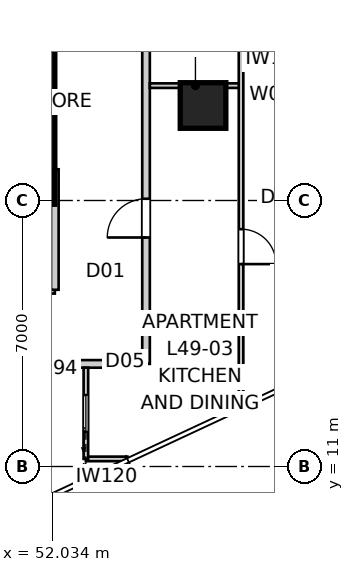
"""IFC4 building model, lengths in metres.
Left out: names, types, materials, properties, quantities, classifications, styles, units other than length and angle.
Written with IfcOpenShell. Run it as: python <this file> out.ifc"""

import sys

from ifc_helpers import new_model, si_unit, direction, frame, frame_2d, origin, origin_2d, place, context, subcontext, project, spatial, polyline, rectangle, outline, extrude, element, fill, save


model = new_model("IFC4")
c1 = context("Model", 3, precision=1e-05, world=origin(), true_north=direction((0.0, 1.0)))
c2 = subcontext(c1, "Body", "Model", "MODEL_VIEW")
j1 = project(units=[si_unit("LENGTHUNIT", "METRE"), si_unit("PLANEANGLEUNIT", "RADIAN")], contexts=[c1])
p1 = place(None, origin())
s1 = spatial("IfcSite", under=j1, at=p1, CompositionType="ELEMENT")
p2 = place(p1, origin())
s2 = spatial("IfcBuilding", under=s1, at=p2, CompositionType="ELEMENT")
p3 = place(p2, frame((0.0, 0.0, 179.4)))
s3 = spatial("IfcBuildingStorey", under=s2, at=p3, CompositionType="ELEMENT", Elevation=179.4)
p4 = place(p3, frame((51.65, 18.8, 0.0), z_axis=(0.0, 0.0, 1.0), x_axis=(0.0, 1.0, 0.0)))
e1 = element("IfcWall", 1, at=p4, inside=s3, PredefinedType="SHEAR", context=c2, shape_type="SweptSolid", body=[
    extrude(outline(polyline([(0.0, -0.45), (22.4, -0.45), (22.4, -0.025), (22.85, -0.025), (22.85, 0.025), (22.4, 0.025), (22.4, 0.45), (0.0, 0.45), (0.0, 0.025), (-0.45, 0.025), (-0.45, -0.025), (0.0, -0.025), (0.0, -0.45)])), origin(), (0.0, 0.0, 1.0), 3.4),
])
p5 = place(p4, frame((11.14, 0.0, 0.0)))
e2 = element("IfcOpeningElement", 2, at=p5, cuts=e1, PredefinedType="OPENING", context=c2, shape_type="SweptSolid", body=[
    extrude(rectangle(XDim=1.02, YDim=2.4, at=frame_2d((0.51, 1.2))), frame((0.0, 0.46, 0.0), z_axis=(0.0, -1.0, 0.0), x_axis=(1.0, 0.0, 0.0)), (0.0, 0.0, 1.0), 0.92),
])
p6 = place(p3, frame((51.65, 18.35, 0.0), z_axis=(0.0, 0.0, 1.0), x_axis=(1.0, 0.0, 0.0)))
e3 = element("IfcColumn", 3, at=p6, inside=s3, PredefinedType="COLUMN", context=c2, shape_type="SweptSolid", body=[
    extrude(rectangle(XDim=0.9, YDim=0.9, at=origin_2d()), origin(), (0.0, 0.0, 1.0), 3.4),
])
p7 = place(p3, frame((56.0, 20.5, 0.0), z_axis=(0.0, 0.0, 1.0), x_axis=(1.0, 0.0, 0.0)))
e4 = element("IfcColumn", 4, at=p7, inside=s3, PredefinedType="COLUMN", context=c2, shape_type="SweptSolid", body=[
    extrude(rectangle(XDim=1.2, YDim=1.2, at=origin_2d()), origin(), (0.0, 0.0, 1.0), 3.4),
])
p8 = place(p3, frame((49.242, 13.7, 0.0), z_axis=(0.0, 0.0, 1.0), x_axis=(1.0, 0.0, 0.0)))
e5 = element("IfcWall", 5, at=p8, inside=s3, PredefinedType="PARTITIONING", context=c2, shape_type="SweptSolid", body=[
    extrude(rectangle(XDim=5.258, YDim=0.2, at=frame_2d((2.629, 0.0))), origin(), (0.0, 0.0, 1.0), 3.25),
])
p9 = place(p3, frame((54.5, 13.7, 0.0), z_axis=(0.0, 0.0, 1.0), x_axis=(0.0, 1.0, 0.0)))
e6 = element("IfcWall", 6, at=p9, inside=s3, PredefinedType="PARTITIONING", context=c2, shape_type="SweptSolid", body=[
    extrude(rectangle(XDim=32.6, YDim=0.2, at=frame_2d((16.3, 0.0))), origin(), (0.0, 0.0, 1.0), 3.25),
])
p10 = place(p9, frame((3.326, 0.0, 0.0)))
e7 = element("IfcOpeningElement", 7, at=p10, cuts=e6, PredefinedType="OPENING", context=c2, shape_type="SweptSolid", body=[
    extrude(rectangle(XDim=1.02, YDim=2.34, at=frame_2d((0.51, 1.17))), frame((0.0, 0.11, 0.0), z_axis=(0.0, -1.0, 0.0), x_axis=(1.0, 0.0, 0.0)), (0.0, 0.0, 1.0), 0.22),
])
p11 = place(p9, frame((19.161, 0.0, 0.0)))
e8 = element("IfcOpeningElement", 8, at=p11, cuts=e6, PredefinedType="OPENING", context=c2, shape_type="SweptSolid", body=[
    extrude(rectangle(XDim=1.02, YDim=2.34, at=frame_2d((0.51, 1.17))), frame((0.0, 0.11, 0.0), z_axis=(0.0, -1.0, 0.0), x_axis=(1.0, 0.0, 0.0)), (0.0, 0.0, 1.0), 0.22),
])
p12 = place(p9, frame((29.73, 0.0, 0.0)))
e9 = element("IfcOpeningElement", 9, at=p12, cuts=e6, PredefinedType="OPENING", context=c2, shape_type="SweptSolid", body=[
    extrude(rectangle(XDim=1.02, YDim=2.34, at=frame_2d((0.51, 1.17))), frame((0.0, 0.11, 0.0), z_axis=(0.0, -1.0, 0.0), x_axis=(1.0, 0.0, 0.0)), (0.0, 0.0, 1.0), 0.22),
])
p13 = place(p9, frame((23.904, 0.0, 0.0)))
e10 = element("IfcOpeningElement", 10, at=p13, cuts=e6, PredefinedType="OPENING", context=c2, shape_type="SweptSolid", body=[
    extrude(rectangle(XDim=1.02, YDim=2.34, at=frame_2d((0.51, 1.17))), frame((0.0, 0.11, 0.0), z_axis=(0.0, -1.0, 0.0), x_axis=(1.0, 0.0, 0.0)), (0.0, 0.0, 1.0), 0.22),
])
p14 = place(p3, frame((27.9, 15.65, 0.0), z_axis=(0.0, 0.0, 1.0), x_axis=(1.0, 0.0, 0.0)))
e11 = element("IfcWall", 11, at=p14, inside=s3, PredefinedType="PARTITIONING", context=c2, shape_type="SweptSolid", body=[
    extrude(rectangle(XDim=24.2, YDim=0.2, at=frame_2d((12.1, 0.0))), origin(), (0.0, 0.0, 1.0), 3.25),
])
p15 = place(p14, frame((4.391, 0.0, 0.0)))
e12 = element("IfcOpeningElement", 12, at=p15, cuts=e11, PredefinedType="OPENING", context=c2, shape_type="SweptSolid", body=[
    extrude(rectangle(XDim=1.02, YDim=2.1, at=frame_2d((0.51, 1.05))), frame((0.0, 0.11, 0.0), z_axis=(0.0, -1.0, 0.0), x_axis=(1.0, 0.0, 0.0)), (0.0, 0.0, 1.0), 0.22),
])
p16 = place(p14, frame((18.789, 0.0, 0.0)))
e13 = element("IfcOpeningElement", 13, at=p16, cuts=e11, PredefinedType="OPENING", context=c2, shape_type="SweptSolid", body=[
    extrude(rectangle(XDim=1.02, YDim=2.1, at=frame_2d((0.51, 1.05))), frame((0.0, 0.11, 0.0), z_axis=(0.0, -1.0, 0.0), x_axis=(1.0, 0.0, 0.0)), (0.0, 0.0, 1.0), 0.22),
])
p17 = place(p14, frame((11.59, 0.0, 0.0)))
e14 = element("IfcOpeningElement", 14, at=p17, cuts=e11, PredefinedType="OPENING", context=c2, shape_type="SweptSolid", body=[
    extrude(rectangle(XDim=1.02, YDim=2.1, at=frame_2d((0.51, 1.05))), frame((0.0, 0.11, 0.0), z_axis=(0.0, -1.0, 0.0), x_axis=(1.0, 0.0, 0.0)), (0.0, 0.0, 1.0), 0.22),
])
p18 = place(p3, frame((52.1, 15.65, 0.0), z_axis=(0.0, 0.0, 1.0), x_axis=(0.0, 1.0, 0.0)))
e15 = element("IfcWall", 15, at=p18, inside=s3, PredefinedType="PARTITIONING", context=c2, shape_type="SweptSolid", body=[
    extrude(rectangle(XDim=3.17, YDim=0.2, at=frame_2d((1.585, 0.0))), origin(), (0.0, 0.0, 1.0), 3.25),
])
p19 = place(p3, frame((54.6, 21.023, 0.0), z_axis=(0.0, 0.0, 1.0), x_axis=(1.0, 0.0, 0.0)))
e16 = element("IfcWall", 16, at=p19, inside=s3, PredefinedType="PARTITIONING", context=c2, shape_type="SweptSolid", body=[
    extrude(rectangle(XDim=2.4, YDim=0.12, at=frame_2d((1.2, 0.0))), origin(), (0.0, 0.0, 1.0), 3.25),
])
p20 = place(p3, frame((54.011, 11.2, 0.0), z_axis=(0.0, 0.0, 1.0), x_axis=(-1.0, 0.0, 0.0)))
e17 = element("IfcWall", 17, at=p20, inside=s3, PredefinedType="PARTITIONING", context=c2, shape_type="SweptSolid", body=[
    extrude(rectangle(XDim=1.094, YDim=0.12, at=frame_2d((0.547, 0.0))), origin(), (0.0, 0.0, 1.0), 3.25),
])
p21 = place(p3, frame((52.917, 11.2, 0.0), z_axis=(0.0, 0.0, 1.0), x_axis=(0.0, 1.0, 0.0)))
e18 = element("IfcWall", 18, at=p21, inside=s3, PredefinedType="PARTITIONING", context=c2, shape_type="SweptSolid", body=[
    extrude(rectangle(XDim=2.4, YDim=0.12, at=frame_2d((1.2, 0.0))), origin(), (0.0, 0.0, 1.0), 3.25),
])
p22 = place(p21, frame((0.72, 0.0, 0.0)))
e19 = element("IfcOpeningElement", 19, at=p22, cuts=e18, PredefinedType="OPENING", context=c2, shape_type="SweptSolid", body=[
    extrude(rectangle(XDim=0.96, YDim=2.1, at=frame_2d((0.48, 1.05))), frame((0.0, 0.07, 0.0), z_axis=(0.0, -1.0, 0.0), x_axis=(1.0, 0.0, 0.0)), (0.0, 0.0, 1.0), 0.14),
])
p23 = place(p3, frame((57.0, 37.927, 0.0), z_axis=(0.0, 0.0, 1.0), x_axis=(0.0, -1.0, 0.0)))
e20 = element("IfcWall", 20, at=p23, inside=s3, PredefinedType="PARTITIONING", context=c2, shape_type="SweptSolid", body=[
    extrude(rectangle(XDim=25.333, YDim=0.12, at=frame_2d((12.667, 0.0))), origin(), (0.0, 0.0, 1.0), 2.55),
])
p24 = place(p23, frame((20.681, 0.0, 0.0)))
e21 = element("IfcOpeningElement", 21, at=p24, cuts=e20, PredefinedType="OPENING", context=c2, shape_type="SweptSolid", body=[
    extrude(rectangle(XDim=0.92, YDim=2.34, at=frame_2d((0.46, 1.17))), frame((0.0, 0.07, 0.0), z_axis=(0.0, -1.0, 0.0), x_axis=(1.0, 0.0, 0.0)), (0.0, 0.0, 1.0), 0.14),
])
p25 = place(p23, frame((2.188, 0.0, 0.0)))
e22 = element("IfcOpeningElement", 22, at=p25, cuts=e20, PredefinedType="OPENING", context=c2, shape_type="SweptSolid", body=[
    extrude(rectangle(XDim=0.92, YDim=2.34, at=frame_2d((0.46, 1.17))), frame((0.0, 0.07, 0.0), z_axis=(0.0, -1.0, 0.0), x_axis=(1.0, 0.0, 0.0)), (0.0, 0.0, 1.0), 0.14),
])
p26 = place(p23, frame((6.096, 0.0, 0.0)))
e23 = element("IfcOpeningElement", 23, at=p26, cuts=e20, PredefinedType="OPENING", context=c2, shape_type="SweptSolid", body=[
    extrude(rectangle(XDim=0.92, YDim=2.34, at=frame_2d((0.46, 1.17))), frame((0.0, 0.07, 0.0), z_axis=(0.0, -1.0, 0.0), x_axis=(1.0, 0.0, 0.0)), (0.0, 0.0, 1.0), 0.14),
])
p27 = place(p23, frame((12.65, 0.0, 0.0)))
e24 = element("IfcOpeningElement", 24, at=p27, cuts=e20, PredefinedType="OPENING", context=c2, shape_type="SweptSolid", body=[
    extrude(rectangle(XDim=0.96, YDim=2.1, at=frame_2d((0.48, 1.05))), frame((0.0, 0.07, 0.0), z_axis=(0.0, -1.0, 0.0), x_axis=(1.0, 0.0, 0.0)), (0.0, 0.0, 1.0), 0.14),
])
p28 = place(p10, origin())
e25 = element("IfcDoor", 25, at=p28, inside=s3, OperationType="SINGLE_SWING_LEFT", PredefinedType="DOOR", context=c2, shape_type="SweptSolid", body=[
    extrude(rectangle(XDim=1.02, YDim=2.34, at=frame_2d((0.51, 1.17))), frame((0.0, 0.025, 0.0), z_axis=(0.0, -1.0, 0.0), x_axis=(1.0, 0.0, 0.0)), (0.0, 0.0, 1.0), 0.05),
])
fill(e7, e25)
p29 = place(p24, origin())
e26 = element("IfcDoor", 26, at=p29, inside=s3, OperationType="SINGLE_SWING_RIGHT", PredefinedType="DOOR", context=c2, shape_type="SweptSolid", body=[
    extrude(rectangle(XDim=0.92, YDim=2.34, at=frame_2d((0.46, 1.17))), frame((0.0, 0.025, 0.0), z_axis=(0.0, -1.0, 0.0), x_axis=(1.0, 0.0, 0.0)), (0.0, 0.0, 1.0), 0.05),
])
fill(e21, e26)
p30 = place(p22, origin())
e27 = element("IfcDoor", 27, at=p30, inside=s3, OperationType="SLIDING_TO_LEFT", PredefinedType="DOOR", context=c2, shape_type="SweptSolid", body=[
    extrude(rectangle(XDim=0.96, YDim=2.1, at=frame_2d((0.48, 1.05))), frame((0.0, 0.025, 0.0), z_axis=(0.0, -1.0, 0.0), x_axis=(1.0, 0.0, 0.0)), (0.0, 0.0, 1.0), 0.05),
])
fill(e19, e27)
save(model, sys.argv[1])
